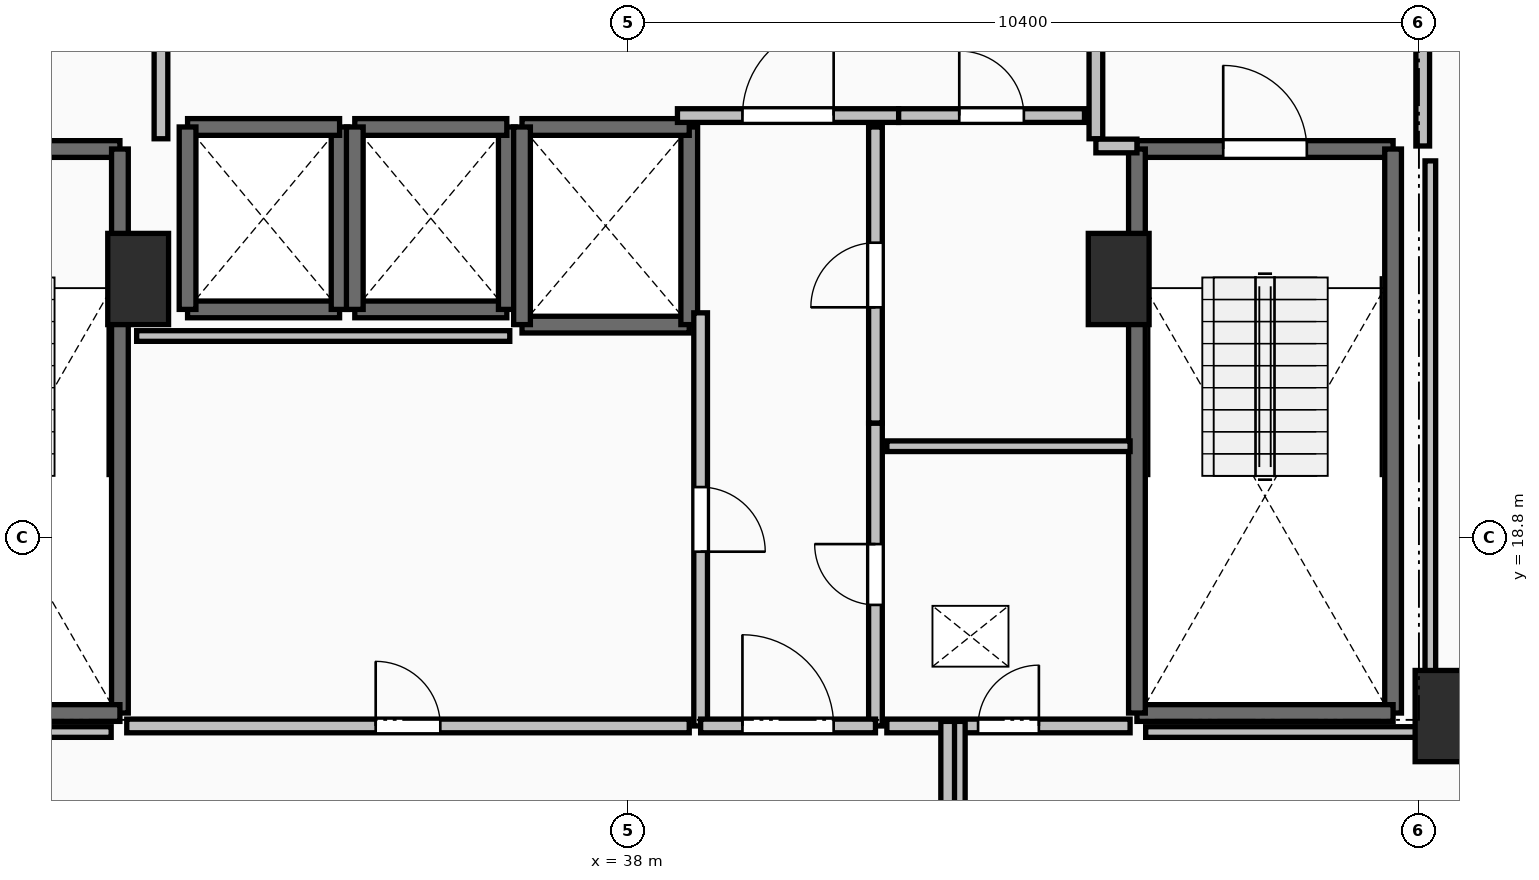
"""IFC4 building model, lengths in metres.
Left out: names, types, materials, properties, quantities, classifications, styles, units other than length and angle.
Written with IfcOpenShell. Run it as: python <this file> out.ifc"""

import sys

from ifc_helpers import new_model, si_unit, direction, frame, frame_2d, origin, origin_2d, place, context, subcontext, project, spatial, rectangle, extrude, element, fill, save


model = new_model("IFC4")
c1 = context("Model", 3, precision=1e-05, world=origin(), true_north=direction((0.0, 1.0)))
c2 = subcontext(c1, "Body", "Model", "MODEL_VIEW")
j1 = project(units=[si_unit("LENGTHUNIT", "METRE"), si_unit("PLANEANGLEUNIT", "RADIAN")], contexts=[c1])
p1 = place(None, origin())
s1 = spatial("IfcSite", under=j1, at=p1, CompositionType="ELEMENT")
p2 = place(p1, origin())
s2 = spatial("IfcBuilding", under=s1, at=p2, CompositionType="ELEMENT")
p3 = place(p2, frame((0.0, 0.0, 92.8)))
s3 = spatial("IfcBuildingStorey", under=s2, at=p3, CompositionType="ELEMENT", Elevation=92.8)
for number, where, z_axis, x_axis in (
    (1, (31.55, 22.2, 0.0), (0.0, 0.0, 1.0), (1.0, 0.0, 0.0)),
    (2, (48.75, 16.45, 0.0), (0.0, 0.0, 1.0), (1.0, 0.0, 0.0)),
    (3, (44.45, 22.2, 0.0), (0.0, 0.0, 1.0), (1.0, 0.0, 0.0)),
):
    element("IfcColumn", number, at=place(p3, frame(where, z_axis=z_axis, x_axis=x_axis)), inside=s3, PredefinedType="PILASTER", context=c2, shape_type="SweptSolid", body=[
        extrude(rectangle(XDim=0.8, YDim=1.2, at=origin_2d()), origin(), (0.0, 0.0, 1.0), 3.5),
    ])
p4 = place(p3, frame((27.94, 23.91, 0.0), z_axis=(0.0, 0.0, 1.0), x_axis=(1.0, 0.0, 0.0)))
e4 = element("IfcWall", 4, at=p4, inside=s3, PredefinedType="SOLIDWALL", context=c2, shape_type="SweptSolid", body=[
    extrude(rectangle(XDim=3.37, YDim=0.22, at=frame_2d((1.685, 0.0))), origin(), (0.0, 0.0, 1.0), 3.24),
])
p5 = place(p4, frame((1.135, 0.0, 0.0)))
e5 = element("IfcOpeningElement", 5, at=p5, cuts=e4, PredefinedType="OPENING", context=c2, shape_type="SweptSolid", body=[
    extrude(rectangle(XDim=1.1, YDim=2.15, at=frame_2d((0.55, 1.075))), frame((0.0, 0.125, 0.0), z_axis=(0.0, -1.0, 0.0), x_axis=(1.0, 0.0, 0.0)), (0.0, 0.0, 1.0), 0.25),
])
p6 = place(p3, frame((31.31, 23.91, 0.0), z_axis=(0.0, 0.0, 1.0), x_axis=(0.0, -1.0, 0.0)))
e6 = element("IfcWall", 6, at=p6, inside=s3, PredefinedType="SOLIDWALL", context=c2, shape_type="SweptSolid", body=[
    extrude(rectangle(XDim=7.42, YDim=0.22, at=frame_2d((3.71, 0.0))), origin(), (0.0, 0.0, 1.0), 3.24),
])
p7 = place(p3, frame((31.31, 16.49, 0.0), z_axis=(0.0, 0.0, 1.0), x_axis=(-1.0, 0.0, 0.0)))
e7 = element("IfcWall", 7, at=p7, inside=s3, PredefinedType="SOLIDWALL", context=c2, shape_type="SweptSolid", body=[
    extrude(rectangle(XDim=3.37, YDim=0.22, at=frame_2d((1.685, 0.0))), origin(), (0.0, 0.0, 1.0), 3.24),
])
p8 = place(p3, frame((44.69, 23.91, 0.0), z_axis=(0.0, 0.0, 1.0), x_axis=(1.0, 0.0, 0.0)))
e8 = element("IfcWall", 8, at=p8, inside=s3, PredefinedType="SOLIDWALL", context=c2, shape_type="SweptSolid", body=[
    extrude(rectangle(XDim=3.37, YDim=0.22, at=frame_2d((1.685, 0.0))), origin(), (0.0, 0.0, 1.0), 3.24),
])
p9 = place(p8, frame((1.135, 0.0, 0.0)))
e9 = element("IfcOpeningElement", 9, at=p9, cuts=e8, PredefinedType="OPENING", context=c2, shape_type="SweptSolid", body=[
    extrude(rectangle(XDim=1.1, YDim=2.15, at=frame_2d((0.55, 1.075))), frame((0.0, 0.125, 0.0), z_axis=(0.0, -1.0, 0.0), x_axis=(1.0, 0.0, 0.0)), (0.0, 0.0, 1.0), 0.25),
])
p10 = place(p3, frame((48.06, 23.91, 0.0), z_axis=(0.0, 0.0, 1.0), x_axis=(0.0, -1.0, 0.0)))
e10 = element("IfcWall", 10, at=p10, inside=s3, PredefinedType="SOLIDWALL", context=c2, shape_type="SweptSolid", body=[
    extrude(rectangle(XDim=7.42, YDim=0.22, at=frame_2d((3.71, 0.0))), origin(), (0.0, 0.0, 1.0), 3.24),
])
p11 = place(p3, frame((48.06, 16.49, 0.0), z_axis=(0.0, 0.0, 1.0), x_axis=(-1.0, 0.0, 0.0)))
e11 = element("IfcWall", 11, at=p11, inside=s3, PredefinedType="SOLIDWALL", context=c2, shape_type="SweptSolid", body=[
    extrude(rectangle(XDim=3.37, YDim=0.22, at=frame_2d((1.685, 0.0))), origin(), (0.0, 0.0, 1.0), 3.24),
])
p12 = place(p3, frame((44.69, 16.49, 0.0), z_axis=(0.0, 0.0, 1.0), x_axis=(0.0, 1.0, 0.0)))
e12 = element("IfcWall", 12, at=p12, inside=s3, PredefinedType="SOLIDWALL", context=c2, shape_type="SweptSolid", body=[
    extrude(rectangle(XDim=7.42, YDim=0.22, at=frame_2d((3.71, 0.0))), origin(), (0.0, 0.0, 1.0), 3.24),
])
p13 = place(p3, frame((32.2, 21.8, 0.0), z_axis=(0.0, 0.0, 1.0), x_axis=(1.0, 0.0, 0.0)))
e13 = element("IfcWall", 13, at=p13, inside=s3, PredefinedType="SOLIDWALL", context=c2, shape_type="SweptSolid", body=[
    extrude(rectangle(XDim=2.0, YDim=0.22, at=frame_2d((1.0, 0.0))), origin(), (0.0, 0.0, 1.0), 3.24),
])
p14 = place(p3, frame((34.2, 21.8, 0.0), z_axis=(0.0, 0.0, 1.0), x_axis=(0.0, 1.0, 0.0)))
e14 = element("IfcWall", 14, at=p14, inside=s3, PredefinedType="SOLIDWALL", context=c2, shape_type="SweptSolid", body=[
    extrude(rectangle(XDim=2.4, YDim=0.22, at=frame_2d((1.2, 0.0))), origin(), (0.0, 0.0, 1.0), 3.24),
])
p15 = place(p3, frame((34.2, 24.2, 0.0), z_axis=(0.0, 0.0, 1.0), x_axis=(-1.0, 0.0, 0.0)))
e15 = element("IfcWall", 15, at=p15, inside=s3, PredefinedType="SOLIDWALL", context=c2, shape_type="SweptSolid", body=[
    extrude(rectangle(XDim=2.0, YDim=0.22, at=frame_2d((1.0, 0.0))), origin(), (0.0, 0.0, 1.0), 3.24),
])
p16 = place(p3, frame((32.2, 24.2, 0.0), z_axis=(0.0, 0.0, 1.0), x_axis=(0.0, -1.0, 0.0)))
e16 = element("IfcWall", 16, at=p16, inside=s3, PredefinedType="SOLIDWALL", context=c2, shape_type="SweptSolid", body=[
    extrude(rectangle(XDim=2.4, YDim=0.22, at=frame_2d((1.2, 0.0))), origin(), (0.0, 0.0, 1.0), 3.24),
])
p17 = place(p3, frame((34.4, 21.8, 0.0), z_axis=(0.0, 0.0, 1.0), x_axis=(1.0, 0.0, 0.0)))
e17 = element("IfcWall", 17, at=p17, inside=s3, PredefinedType="SOLIDWALL", context=c2, shape_type="SweptSolid", body=[
    extrude(rectangle(XDim=2.0, YDim=0.22, at=frame_2d((1.0, 0.0))), origin(), (0.0, 0.0, 1.0), 3.24),
])
p18 = place(p3, frame((36.4, 21.8, 0.0), z_axis=(0.0, 0.0, 1.0), x_axis=(0.0, 1.0, 0.0)))
e18 = element("IfcWall", 18, at=p18, inside=s3, PredefinedType="SOLIDWALL", context=c2, shape_type="SweptSolid", body=[
    extrude(rectangle(XDim=2.4, YDim=0.22, at=frame_2d((1.2, 0.0))), origin(), (0.0, 0.0, 1.0), 3.24),
])
p19 = place(p3, frame((36.4, 24.2, 0.0), z_axis=(0.0, 0.0, 1.0), x_axis=(-1.0, 0.0, 0.0)))
e19 = element("IfcWall", 19, at=p19, inside=s3, PredefinedType="SOLIDWALL", context=c2, shape_type="SweptSolid", body=[
    extrude(rectangle(XDim=2.0, YDim=0.22, at=frame_2d((1.0, 0.0))), origin(), (0.0, 0.0, 1.0), 3.24),
])
p20 = place(p3, frame((34.4, 24.2, 0.0), z_axis=(0.0, 0.0, 1.0), x_axis=(0.0, -1.0, 0.0)))
e20 = element("IfcWall", 20, at=p20, inside=s3, PredefinedType="SOLIDWALL", context=c2, shape_type="SweptSolid", body=[
    extrude(rectangle(XDim=2.4, YDim=0.22, at=frame_2d((1.2, 0.0))), origin(), (0.0, 0.0, 1.0), 3.24),
])
p21 = place(p3, frame((36.6, 21.6, 0.0), z_axis=(0.0, 0.0, 1.0), x_axis=(1.0, 0.0, 0.0)))
e21 = element("IfcWall", 21, at=p21, inside=s3, PredefinedType="SOLIDWALL", context=c2, shape_type="SweptSolid", body=[
    extrude(rectangle(XDim=2.2, YDim=0.22, at=frame_2d((1.1, 0.0))), origin(), (0.0, 0.0, 1.0), 3.24),
])
p22 = place(p3, frame((38.8, 21.6, 0.0), z_axis=(0.0, 0.0, 1.0), x_axis=(0.0, 1.0, 0.0)))
e22 = element("IfcWall", 22, at=p22, inside=s3, PredefinedType="SOLIDWALL", context=c2, shape_type="SweptSolid", body=[
    extrude(rectangle(XDim=2.6, YDim=0.22, at=frame_2d((1.3, 0.0))), origin(), (0.0, 0.0, 1.0), 3.24),
])
p23 = place(p3, frame((38.8, 24.2, 0.0), z_axis=(0.0, 0.0, 1.0), x_axis=(-1.0, 0.0, 0.0)))
e23 = element("IfcWall", 23, at=p23, inside=s3, PredefinedType="SOLIDWALL", context=c2, shape_type="SweptSolid", body=[
    extrude(rectangle(XDim=2.2, YDim=0.22, at=frame_2d((1.1, 0.0))), origin(), (0.0, 0.0, 1.0), 3.24),
])
p24 = place(p3, frame((36.6, 24.2, 0.0), z_axis=(0.0, 0.0, 1.0), x_axis=(0.0, -1.0, 0.0)))
e24 = element("IfcWall", 24, at=p24, inside=s3, PredefinedType="SOLIDWALL", context=c2, shape_type="SweptSolid", body=[
    extrude(rectangle(XDim=2.6, YDim=0.22, at=frame_2d((1.3, 0.0))), origin(), (0.0, 0.0, 1.0), 3.24),
])
p25 = place(p3, frame((31.85, 24.045, 0.0), z_axis=(0.0, 0.0, 1.0), x_axis=(0.0, 1.0, 0.0)))
e25 = element("IfcWall", 25, at=p25, inside=s3, PredefinedType="PARTITIONING", context=c2, shape_type="SweptSolid", body=[
    extrude(rectangle(XDim=3.91, YDim=0.18, at=frame_2d((1.955, 0.0))), origin(), (0.0, 0.0, 1.0), 3.24),
])
p26 = place(p25, frame((1.355, 0.0, 0.0)))
e26 = element("IfcOpeningElement", 26, at=p26, cuts=e25, PredefinedType="OPENING", context=c2, shape_type="SweptSolid", body=[
    extrude(rectangle(XDim=1.2, YDim=2.15, at=frame_2d((0.6, 1.075))), frame((0.0, 0.105, 0.0), z_axis=(0.0, -1.0, 0.0), x_axis=(1.0, 0.0, 0.0)), (0.0, 0.0, 1.0), 0.21),
])
p27 = place(p3, frame((44.15, 27.955, 0.0), z_axis=(0.0, 0.0, 1.0), x_axis=(0.0, -1.0, 0.0)))
e27 = element("IfcWall", 27, at=p27, inside=s3, PredefinedType="PARTITIONING", context=c2, shape_type="SweptSolid", body=[
    extrude(rectangle(XDim=3.91, YDim=0.18, at=frame_2d((1.955, 0.0))), origin(), (0.0, 0.0, 1.0), 3.24),
])
p28 = place(p27, frame((1.355, 0.0, 0.0)))
e28 = element("IfcOpeningElement", 28, at=p28, cuts=e27, PredefinedType="OPENING", context=c2, shape_type="SweptSolid", body=[
    extrude(rectangle(XDim=1.2, YDim=2.15, at=frame_2d((0.6, 1.075))), frame((0.0, 0.105, 0.0), z_axis=(0.0, -1.0, 0.0), x_axis=(1.0, 0.0, 0.0)), (0.0, 0.0, 1.0), 0.21),
])
p29 = place(p3, frame((44.15, 23.95, 0.0), z_axis=(0.0, 0.0, 1.0), x_axis=(1.0, 0.0, 0.0)))
e29 = element("IfcWall", 29, at=p29, inside=s3, PredefinedType="PARTITIONING", context=c2, shape_type="SweptSolid", body=[
    extrude(rectangle(XDim=0.54, YDim=0.18, at=frame_2d((0.27, 0.0))), origin(), (0.0, 0.0, 1.0), 3.24),
])
p30 = place(p3, frame((48.45, 23.95, 0.0), z_axis=(0.0, 0.0, 1.0), x_axis=(0.0, 1.0, 0.0)))
e30 = element("IfcWall", 30, at=p30, inside=s3, PredefinedType="PARTITIONING", context=c2, shape_type="SweptSolid", body=[
    extrude(rectangle(XDim=4.05, YDim=0.18, at=frame_2d((2.025, 0.0))), origin(), (0.0, 0.0, 1.0), 3.24),
])
p31 = place(p30, frame((1.425, 0.0, 0.0)))
e31 = element("IfcOpeningElement", 31, at=p31, cuts=e30, PredefinedType="OPENING", context=c2, shape_type="SweptSolid", body=[
    extrude(rectangle(XDim=1.2, YDim=2.15, at=frame_2d((0.6, 1.075))), frame((0.0, 0.105, 0.0), z_axis=(0.0, -1.0, 0.0), x_axis=(1.0, 0.0, 0.0)), (0.0, 0.0, 1.0), 0.21),
])
p32 = place(p3, frame((38.645, 24.35, 0.0), z_axis=(0.0, 0.0, 1.0), x_axis=(1.0, 0.0, 0.0)))
e32 = element("IfcWall", 32, at=p32, inside=s3, PredefinedType="PARTITIONING", context=c2, shape_type="SweptSolid", body=[
    extrude(rectangle(XDim=2.91, YDim=0.18, at=frame_2d((1.455, 0.0))), origin(), (0.0, 0.0, 1.0), 3.24),
])
p33 = place(p32, frame((0.855, 0.0, 0.0)))
e33 = element("IfcOpeningElement", 33, at=p33, cuts=e32, PredefinedType="OPENING", context=c2, shape_type="SweptSolid", body=[
    extrude(rectangle(XDim=1.2, YDim=2.15, at=frame_2d((0.6, 1.075))), frame((0.0, 0.105, 0.0), z_axis=(0.0, -1.0, 0.0), x_axis=(1.0, 0.0, 0.0)), (0.0, 0.0, 1.0), 0.21),
])
p34 = place(p3, frame((41.555, 24.35, 0.0), z_axis=(0.0, 0.0, 1.0), x_axis=(1.0, 0.0, 0.0)))
e34 = element("IfcWall", 34, at=p34, inside=s3, PredefinedType="PARTITIONING", context=c2, shape_type="SweptSolid", body=[
    extrude(rectangle(XDim=2.445, YDim=0.18, at=frame_2d((1.223, 0.0))), origin(), (0.0, 0.0, 1.0), 3.24),
])
p35 = place(p34, frame((0.798, 0.0, 0.0)))
e35 = element("IfcOpeningElement", 35, at=p35, cuts=e34, PredefinedType="OPENING", context=c2, shape_type="SweptSolid", body=[
    extrude(rectangle(XDim=0.85, YDim=2.1, at=frame_2d((0.425, 1.05))), frame((0.0, 0.105, 0.0), z_axis=(0.0, -1.0, 0.0), x_axis=(1.0, 0.0, 0.0)), (0.0, 0.0, 1.0), 0.21),
])
p36 = place(p3, frame((41.25, 16.32, 0.0), z_axis=(0.0, 0.0, 1.0), x_axis=(0.0, 1.0, 0.0)))
e36 = element("IfcWall", 36, at=p36, inside=s3, PredefinedType="PARTITIONING", context=c2, shape_type="SweptSolid", body=[
    extrude(rectangle(XDim=3.985, YDim=0.18, at=frame_2d((1.992, 0.0))), origin(), (0.0, 0.0, 1.0), 3.24),
])
p37 = place(p36, frame((1.593, 0.0, 0.0)))
e37 = element("IfcOpeningElement", 37, at=p37, cuts=e36, PredefinedType="OPENING", context=c2, shape_type="SweptSolid", body=[
    extrude(rectangle(XDim=0.8, YDim=2.05, at=frame_2d((0.4, 1.025))), frame((0.0, 0.105, 0.0), z_axis=(0.0, -1.0, 0.0), x_axis=(1.0, 0.0, 0.0)), (0.0, 0.0, 1.0), 0.21),
])
p38 = place(p3, frame((41.25, 20.305, 0.0), z_axis=(0.0, 0.0, 1.0), x_axis=(0.0, 1.0, 0.0)))
e38 = element("IfcWall", 38, at=p38, inside=s3, PredefinedType="PARTITIONING", context=c2, shape_type="SweptSolid", body=[
    extrude(rectangle(XDim=3.895, YDim=0.18, at=frame_2d((1.948, 0.0))), origin(), (0.0, 0.0, 1.0), 3.24),
])
p39 = place(p38, frame((1.522, 0.0, 0.0)))
e39 = element("IfcOpeningElement", 39, at=p39, cuts=e38, PredefinedType="OPENING", context=c2, shape_type="SweptSolid", body=[
    extrude(rectangle(XDim=0.85, YDim=2.1, at=frame_2d((0.425, 1.05))), frame((0.0, 0.105, 0.0), z_axis=(0.0, -1.0, 0.0), x_axis=(1.0, 0.0, 0.0)), (0.0, 0.0, 1.0), 0.21),
])
p40 = place(p3, frame((38.95, 21.755, 0.0), z_axis=(0.0, 0.0, 1.0), x_axis=(0.0, -1.0, 0.0)))
e40 = element("IfcWall", 40, at=p40, inside=s3, PredefinedType="PARTITIONING", context=c2, shape_type="SweptSolid", body=[
    extrude(rectangle(XDim=5.435, YDim=0.18, at=frame_2d((2.717, 0.0))), origin(), (0.0, 0.0, 1.0), 3.24),
])
p41 = place(p40, frame((2.292, 0.0, 0.0)))
e41 = element("IfcOpeningElement", 41, at=p41, cuts=e40, PredefinedType="OPENING", context=c2, shape_type="SweptSolid", body=[
    extrude(rectangle(XDim=0.85, YDim=2.1, at=frame_2d((0.425, 1.05))), frame((0.0, 0.105, 0.0), z_axis=(0.0, -1.0, 0.0), x_axis=(1.0, 0.0, 0.0)), (0.0, 0.0, 1.0), 0.21),
])
p42 = place(p3, frame((38.95, 16.32, 0.0), z_axis=(0.0, 0.0, 1.0), x_axis=(1.0, 0.0, 0.0)))
e42 = element("IfcWall", 42, at=p42, inside=s3, PredefinedType="PARTITIONING", context=c2, shape_type="SweptSolid", body=[
    extrude(rectangle(XDim=2.3, YDim=0.18, at=frame_2d((1.15, 0.0))), origin(), (0.0, 0.0, 1.0), 3.24),
])
p43 = place(p42, frame((0.55, 0.0, 0.0)))
e43 = element("IfcOpeningElement", 43, at=p43, cuts=e42, PredefinedType="OPENING", context=c2, shape_type="SweptSolid", body=[
    extrude(rectangle(XDim=1.2, YDim=2.15, at=frame_2d((0.6, 1.075))), frame((0.0, 0.105, 0.0), z_axis=(0.0, -1.0, 0.0), x_axis=(1.0, 0.0, 0.0)), (0.0, 0.0, 1.0), 0.21),
])
p44 = place(p3, frame((44.6, 20.0, 0.0), z_axis=(0.0, 0.0, 1.0), x_axis=(-1.0, 0.0, 0.0)))
e44 = element("IfcWall", 44, at=p44, inside=s3, PredefinedType="PARTITIONING", context=c2, shape_type="SweptSolid", body=[
    extrude(rectangle(XDim=3.2, YDim=0.14, at=frame_2d((1.6, 0.0))), origin(), (0.0, 0.0, 1.0), 3.24),
])
p45 = place(p3, frame((41.4, 16.32, 0.0), z_axis=(0.0, 0.0, 1.0), x_axis=(1.0, 0.0, 0.0)))
e45 = element("IfcWall", 45, at=p45, inside=s3, PredefinedType="PARTITIONING", context=c2, shape_type="SweptSolid", body=[
    extrude(rectangle(XDim=3.2, YDim=0.18, at=frame_2d((1.6, 0.0))), origin(), (0.0, 0.0, 1.0), 3.24),
])
p46 = place(p45, frame((1.2, 0.0, 0.0)))
e46 = element("IfcOpeningElement", 46, at=p46, cuts=e45, PredefinedType="OPENING", context=c2, shape_type="SweptSolid", body=[
    extrude(rectangle(XDim=0.8, YDim=2.05, at=frame_2d((0.4, 1.025))), frame((0.0, 0.105, 0.0), z_axis=(0.0, -1.0, 0.0), x_axis=(1.0, 0.0, 0.0)), (0.0, 0.0, 1.0), 0.21),
])
p47 = place(p3, frame((31.4, 16.32, 0.0), z_axis=(0.0, 0.0, 1.0), x_axis=(1.0, 0.0, 0.0)))
e47 = element("IfcWall", 47, at=p47, inside=s3, PredefinedType="PARTITIONING", context=c2, shape_type="SweptSolid", body=[
    extrude(rectangle(XDim=7.4, YDim=0.18, at=frame_2d((3.7, 0.0))), origin(), (0.0, 0.0, 1.0), 3.24),
])
p48 = place(p47, frame((3.275, 0.0, 0.0)))
e48 = element("IfcOpeningElement", 48, at=p48, cuts=e47, PredefinedType="OPENING", context=c2, shape_type="SweptSolid", body=[
    extrude(rectangle(XDim=0.85, YDim=2.1, at=frame_2d((0.425, 1.05))), frame((0.0, 0.105, 0.0), z_axis=(0.0, -1.0, 0.0), x_axis=(1.0, 0.0, 0.0)), (0.0, 0.0, 1.0), 0.21),
])
for number, where, z_axis, x_axis in (
    (49, (42.34, 16.38, 0.0), (0.0, 0.0, 1.0), (0.0, -1.0, 0.0)),
    (50, (42.2, 13.96, 0.0), (0.0, 0.0, 1.0), (0.0, 1.0, 0.0)),
):
    element("IfcWall", number, at=place(p3, frame(where, z_axis=z_axis, x_axis=x_axis)), inside=s3, PredefinedType="PARTITIONING", context=c2, shape_type="SweptSolid", body=[
        extrude(rectangle(XDim=2.42, YDim=0.18, at=frame_2d((1.21, 0.0))), origin(), (0.0, 0.0, 1.0), 2.972),
    ])
p49 = place(p3, frame((36.439, 21.45, 0.0), z_axis=(0.0, 0.0, 1.0), x_axis=(-1.0, 0.0, 0.0)))
e51 = element("IfcWall", 51, at=p49, inside=s3, PredefinedType="PARTITIONING", context=c2, shape_type="SweptSolid", body=[
    extrude(rectangle(XDim=4.909, YDim=0.14, at=frame_2d((2.455, 0.0))), origin(), (0.0, 0.0, 1.0), 3.24),
])
p50 = place(p3, frame((48.55, 23.754, 0.0), z_axis=(0.0, 0.0, 1.0), x_axis=(0.0, -1.0, 0.0)))
e52 = element("IfcWall", 52, at=p50, inside=s3, PredefinedType="PARTITIONING", context=c2, shape_type="SweptSolid", body=[
    extrude(rectangle(XDim=7.514, YDim=0.14, at=frame_2d((3.757, 0.0))), origin(), (0.0, 0.0, 1.0), 2.432),
])
for number, where, z_axis, x_axis in (
    (53, (48.55, 16.24, 0.0), (0.0, 0.0, 1.0), (-1.0, 0.0, 0.0)),
    (54, (31.195, 16.24, 0.0), (0.0, 0.0, 1.0), (-1.0, 0.0, 0.0)),
):
    element("IfcWall", number, at=place(p3, frame(where, z_axis=z_axis, x_axis=x_axis)), inside=s3, PredefinedType="PARTITIONING", context=c2, shape_type="SweptSolid", body=[
        extrude(rectangle(XDim=3.745, YDim=0.14, at=frame_2d((1.873, 0.0))), origin(), (0.0, 0.0, 1.0), 2.432),
    ])
p51 = place(p9, origin())
e55 = element("IfcDoor", 55, at=p51, inside=s3, OperationType="SINGLE_SWING_LEFT", PredefinedType="DOOR", context=c2, shape_type="SweptSolid", body=[
    extrude(rectangle(XDim=1.1, YDim=2.15, at=frame_2d((0.55, 1.075))), frame((0.0, 0.025, 0.0), z_axis=(0.0, -1.0, 0.0), x_axis=(1.0, 0.0, 0.0)), (0.0, 0.0, 1.0), 0.05),
])
fill(e9, e55)
p52 = place(p33, origin())
e56 = element("IfcDoor", 56, at=p52, inside=s3, OperationType="SINGLE_SWING_RIGHT", PredefinedType="DOOR", context=c2, shape_type="SweptSolid", body=[
    extrude(rectangle(XDim=1.2, YDim=2.15, at=frame_2d((0.6, 1.075))), frame((0.0, 0.025, 0.0), z_axis=(0.0, -1.0, 0.0), x_axis=(1.0, 0.0, 0.0)), (0.0, 0.0, 1.0), 0.05),
])
fill(e33, e56)
p53 = place(p35, origin())
e57 = element("IfcDoor", 57, at=p53, inside=s3, OperationType="SINGLE_SWING_LEFT", PredefinedType="DOOR", context=c2, shape_type="SweptSolid", body=[
    extrude(rectangle(XDim=0.85, YDim=2.1, at=frame_2d((0.425, 1.05))), frame((0.0, 0.025, 0.0), z_axis=(0.0, -1.0, 0.0), x_axis=(1.0, 0.0, 0.0)), (0.0, 0.0, 1.0), 0.05),
])
fill(e35, e57)
p54 = place(p37, origin())
e58 = element("IfcDoor", 58, at=p54, inside=s3, OperationType="SINGLE_SWING_RIGHT", PredefinedType="DOOR", context=c2, shape_type="SweptSolid", body=[
    extrude(rectangle(XDim=0.8, YDim=2.05, at=frame_2d((0.4, 1.025))), frame((0.0, 0.025, 0.0), z_axis=(0.0, -1.0, 0.0), x_axis=(1.0, 0.0, 0.0)), (0.0, 0.0, 1.0), 0.05),
])
fill(e37, e58)
p55 = place(p39, origin())
e59 = element("IfcDoor", 59, at=p55, inside=s3, OperationType="SINGLE_SWING_LEFT", PredefinedType="DOOR", context=c2, shape_type="SweptSolid", body=[
    extrude(rectangle(XDim=0.85, YDim=2.1, at=frame_2d((0.425, 1.05))), frame((0.0, 0.025, 0.0), z_axis=(0.0, -1.0, 0.0), x_axis=(1.0, 0.0, 0.0)), (0.0, 0.0, 1.0), 0.05),
])
fill(e39, e59)
p56 = place(p41, origin())
e60 = element("IfcDoor", 60, at=p56, inside=s3, OperationType="SINGLE_SWING_RIGHT", PredefinedType="DOOR", context=c2, shape_type="SweptSolid", body=[
    extrude(rectangle(XDim=0.85, YDim=2.1, at=frame_2d((0.425, 1.05))), frame((0.0, 0.025, 0.0), z_axis=(0.0, -1.0, 0.0), x_axis=(1.0, 0.0, 0.0)), (0.0, 0.0, 1.0), 0.05),
])
fill(e41, e60)
p57 = place(p43, origin())
e61 = element("IfcDoor", 61, at=p57, inside=s3, OperationType="SINGLE_SWING_LEFT", PredefinedType="DOOR", context=c2, shape_type="SweptSolid", body=[
    extrude(rectangle(XDim=1.2, YDim=2.15, at=frame_2d((0.6, 1.075))), frame((0.0, 0.025, 0.0), z_axis=(0.0, -1.0, 0.0), x_axis=(1.0, 0.0, 0.0)), (0.0, 0.0, 1.0), 0.05),
])
fill(e43, e61)
p58 = place(p46, origin())
e62 = element("IfcDoor", 62, at=p58, inside=s3, OperationType="SINGLE_SWING_RIGHT", PredefinedType="DOOR", context=c2, shape_type="SweptSolid", body=[
    extrude(rectangle(XDim=0.8, YDim=2.05, at=frame_2d((0.4, 1.025))), frame((0.0, 0.025, 0.0), z_axis=(0.0, -1.0, 0.0), x_axis=(1.0, 0.0, 0.0)), (0.0, 0.0, 1.0), 0.05),
])
fill(e46, e62)
p59 = place(p48, origin())
e63 = element("IfcDoor", 63, at=p59, inside=s3, OperationType="SINGLE_SWING_LEFT", PredefinedType="DOOR", context=c2, shape_type="SweptSolid", body=[
    extrude(rectangle(XDim=0.85, YDim=2.1, at=frame_2d((0.425, 1.05))), frame((0.0, 0.025, 0.0), z_axis=(0.0, -1.0, 0.0), x_axis=(1.0, 0.0, 0.0)), (0.0, 0.0, 1.0), 0.05),
])
fill(e48, e63)
save(model, sys.argv[1])
